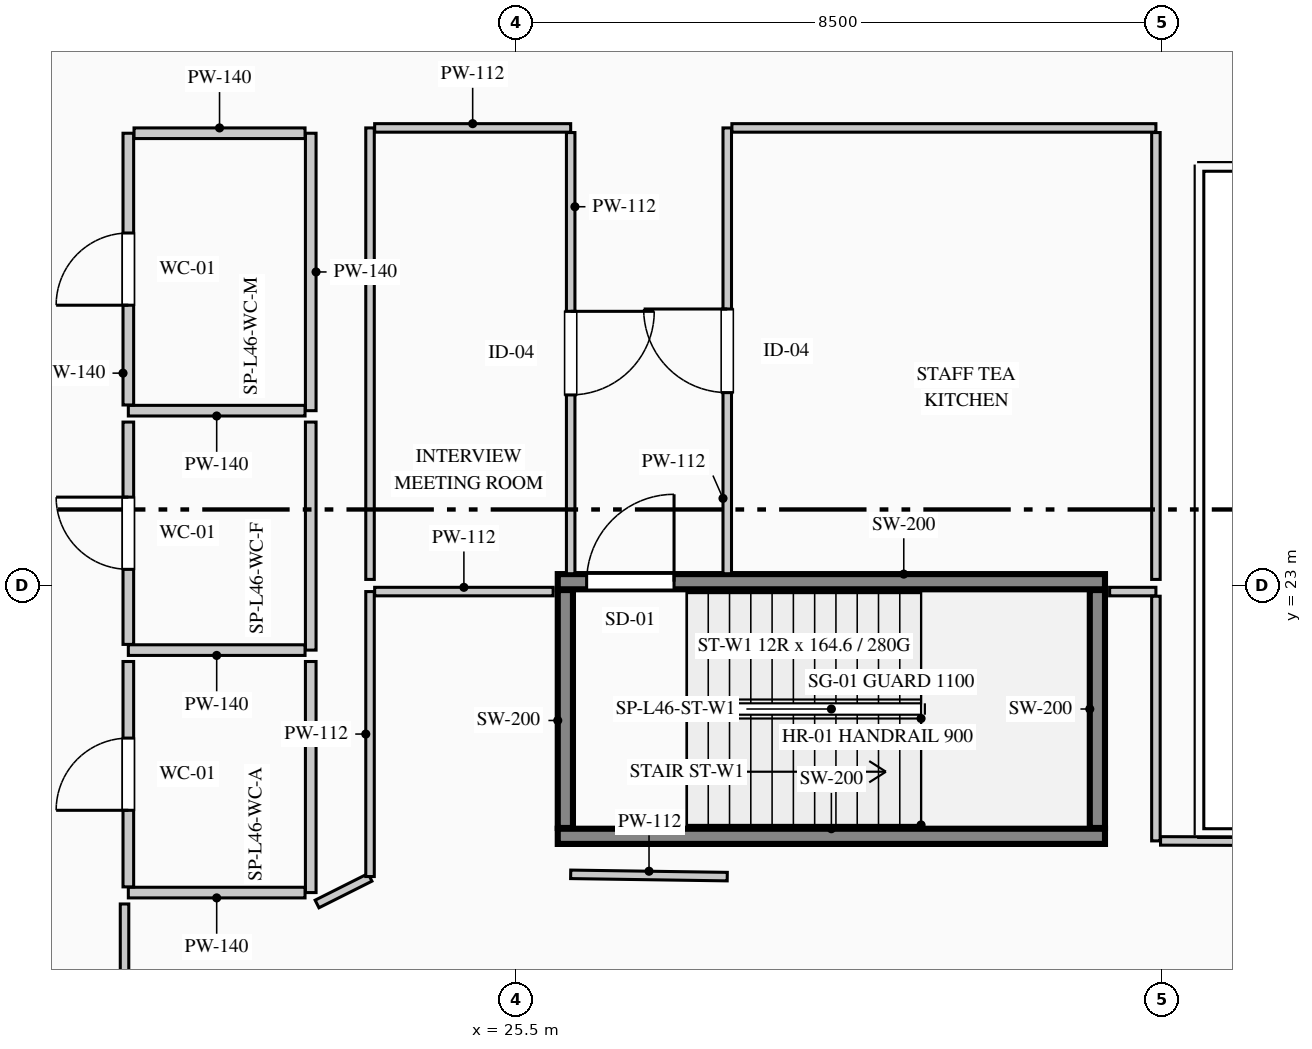
"""IFC4 building model, lengths in metres.
Left out: names, types, materials, properties, quantities, classifications, styles, units other than length and angle.
Written with IfcOpenShell. Run it as: python <this file> out.ifc"""

import sys

from ifc_helpers import new_model, si_unit, direction, frame, frame_2d, origin, place, context, subcontext, project, spatial, rectangle, extrude, element, fill, save


model = new_model("IFC4")
c1 = context("Model", 3, precision=1e-05, world=origin(), true_north=direction((0.0, 1.0)))
c2 = subcontext(c1, "Body", "Model", "MODEL_VIEW")
j1 = project(units=[si_unit("LENGTHUNIT", "METRE"), si_unit("PLANEANGLEUNIT", "RADIAN")], contexts=[c1])
p1 = place(None, origin())
s1 = spatial("IfcSite", under=j1, at=p1, CompositionType="ELEMENT")
p2 = place(p1, origin())
s2 = spatial("IfcBuilding", under=s1, at=p2, CompositionType="ELEMENT")
p3 = place(p2, frame((0.0, 0.0, 195.6)))
s3 = spatial("IfcBuildingStorey", under=s2, at=p3, CompositionType="ELEMENT", Elevation=195.6)
p4 = place(p3, frame((26.05, 19.7, 0.0), z_axis=(0.0, 0.0, 1.0), x_axis=(1.0, 0.0, 0.0)))
e1 = element("IfcWall", 1, at=p4, inside=s3, PredefinedType="SHEAR", context=c2, shape_type="SweptSolid", body=[
    extrude(rectangle(XDim=7.2, YDim=0.2, at=frame_2d((3.6, 0.0))), origin(), (0.0, 0.0, 1.0), 3.95),
])
p5 = place(p3, frame((26.05, 23.05, 0.0), z_axis=(0.0, 0.0, 1.0), x_axis=(1.0, 0.0, 0.0)))
e2 = element("IfcWall", 2, at=p5, inside=s3, PredefinedType="SHEAR", context=c2, shape_type="SweptSolid", body=[
    extrude(rectangle(XDim=7.2, YDim=0.2, at=frame_2d((3.6, 0.0))), origin(), (0.0, 0.0, 1.0), 3.95),
])
p6 = place(p5, frame((0.38, 0.0, 0.0)))
e3 = element("IfcOpeningElement", 3, at=p6, cuts=e2, PredefinedType="OPENING", context=c2, shape_type="SweptSolid", body=[
    extrude(rectangle(XDim=1.15, YDim=2.2, at=frame_2d((0.575, 1.1))), frame((0.0, 0.11, 0.0), z_axis=(0.0, -1.0, 0.0), x_axis=(1.0, 0.0, 0.0)), (0.0, 0.0, 1.0), 0.22),
])
for number, where, z_axis, x_axis in (
    (4, (26.15, 19.81, 0.0), (0.0, 0.0, 1.0), (0.0, 1.0, 0.0)),
    (5, (33.15, 19.81, 0.0), (0.0, 0.0, 1.0), (0.0, 1.0, 0.0)),
):
    element("IfcWall", number, at=place(p3, frame(where, z_axis=z_axis, x_axis=x_axis)), inside=s3, PredefinedType="SHEAR", context=c2, shape_type="SweptSolid", body=[
        extrude(rectangle(XDim=3.13, YDim=0.2, at=frame_2d((1.565, 0.0))), origin(), (0.0, 0.0, 1.0), 3.95),
    ])
p7 = place(p3, frame((22.8, 28.95, 0.0), z_axis=(0.0, 0.0, 1.0), x_axis=(0.0, -1.0, 0.0)))
e6 = element("IfcWall", 6, at=p7, inside=s3, PredefinedType="PARTITIONING", context=c2, shape_type="SweptSolid", body=[
    extrude(rectangle(XDim=3.65, YDim=0.14, at=frame_2d((1.825, 0.0))), origin(), (0.0, 0.0, 1.0), 3.285),
])
p8 = place(p3, frame((22.725, 25.3, 0.0), z_axis=(0.0, 0.0, 1.0), x_axis=(-1.0, 0.0, 0.0)))
e7 = element("IfcWall", 7, at=p8, inside=s3, PredefinedType="PARTITIONING", context=c2, shape_type="SweptSolid", body=[
    extrude(rectangle(XDim=2.325, YDim=0.14, at=frame_2d((1.163, 0.0))), origin(), (0.0, 0.0, 1.0), 3.7),
])
p9 = place(p3, frame((20.4, 25.375, 0.0), z_axis=(0.0, 0.0, 1.0), x_axis=(0.0, 1.0, 0.0)))
e8 = element("IfcWall", 8, at=p9, inside=s3, PredefinedType="PARTITIONING", context=c2, shape_type="SweptSolid", body=[
    extrude(rectangle(XDim=3.575, YDim=0.14, at=frame_2d((1.788, 0.0))), origin(), (0.0, 0.0, 1.0), 3.7),
])
p10 = place(p9, frame((1.312, 0.0, 0.0)))
e9 = element("IfcOpeningElement", 9, at=p10, cuts=e8, PredefinedType="OPENING", context=c2, shape_type="SweptSolid", body=[
    extrude(rectangle(XDim=0.95, YDim=2.15, at=frame_2d((0.475, 1.075))), frame((0.0, 0.08, 0.0), z_axis=(0.0, -1.0, 0.0), x_axis=(1.0, 0.0, 0.0)), (0.0, 0.0, 1.0), 0.16),
])
p11 = place(p3, frame((20.475, 28.95, 0.0), z_axis=(0.0, 0.0, 1.0), x_axis=(1.0, 0.0, 0.0)))
e10 = element("IfcWall", 10, at=p11, inside=s3, PredefinedType="PARTITIONING", context=c2, shape_type="SweptSolid", body=[
    extrude(rectangle(XDim=2.25, YDim=0.14, at=frame_2d((1.125, 0.0))), origin(), (0.0, 0.0, 1.0), 3.7),
])
p12 = place(p3, frame((22.8, 25.15, 0.0), z_axis=(0.0, 0.0, 1.0), x_axis=(0.0, -1.0, 0.0)))
e11 = element("IfcWall", 11, at=p12, inside=s3, PredefinedType="PARTITIONING", context=c2, shape_type="SweptSolid", body=[
    extrude(rectangle(XDim=3.0, YDim=0.14, at=frame_2d((1.5, 0.0))), origin(), (0.0, 0.0, 1.0), 3.285),
])
p13 = place(p3, frame((22.725, 22.15, 0.0), z_axis=(0.0, 0.0, 1.0), x_axis=(-1.0, 0.0, 0.0)))
e12 = element("IfcWall", 12, at=p13, inside=s3, PredefinedType="PARTITIONING", context=c2, shape_type="SweptSolid", body=[
    extrude(rectangle(XDim=2.325, YDim=0.14, at=frame_2d((1.163, 0.0))), origin(), (0.0, 0.0, 1.0), 3.7),
])
p14 = place(p3, frame((20.4, 22.225, 0.0), z_axis=(0.0, 0.0, 1.0), x_axis=(0.0, 1.0, 0.0)))
e13 = element("IfcWall", 13, at=p14, inside=s3, PredefinedType="PARTITIONING", context=c2, shape_type="SweptSolid", body=[
    extrude(rectangle(XDim=2.925, YDim=0.14, at=frame_2d((1.462, 0.0))), origin(), (0.0, 0.0, 1.0), 3.7),
])
p15 = place(p14, frame((0.988, 0.0, 0.0)))
e14 = element("IfcOpeningElement", 14, at=p15, cuts=e13, PredefinedType="OPENING", context=c2, shape_type="SweptSolid", body=[
    extrude(rectangle(XDim=0.95, YDim=2.15, at=frame_2d((0.475, 1.075))), frame((0.0, 0.08, 0.0), z_axis=(0.0, -1.0, 0.0), x_axis=(1.0, 0.0, 0.0)), (0.0, 0.0, 1.0), 0.16),
])
p16 = place(p3, frame((22.8, 22.0, 0.0), z_axis=(0.0, 0.0, 1.0), x_axis=(0.0, -1.0, 0.0)))
e15 = element("IfcWall", 15, at=p16, inside=s3, PredefinedType="PARTITIONING", context=c2, shape_type="SweptSolid", body=[
    extrude(rectangle(XDim=3.04, YDim=0.14, at=frame_2d((1.52, 0.0))), origin(), (0.0, 0.0, 1.0), 3.285),
])
p17 = place(p3, frame((22.725, 18.96, 0.0), z_axis=(0.0, 0.0, 1.0), x_axis=(-1.0, 0.0, 0.0)))
e16 = element("IfcWall", 16, at=p17, inside=s3, PredefinedType="PARTITIONING", context=c2, shape_type="SweptSolid", body=[
    extrude(rectangle(XDim=2.325, YDim=0.14, at=frame_2d((1.163, 0.0))), origin(), (0.0, 0.0, 1.0), 3.7),
])
p18 = place(p3, frame((20.4, 19.035, 0.0), z_axis=(0.0, 0.0, 1.0), x_axis=(0.0, 1.0, 0.0)))
e17 = element("IfcWall", 17, at=p18, inside=s3, PredefinedType="PARTITIONING", context=c2, shape_type="SweptSolid", body=[
    extrude(rectangle(XDim=2.965, YDim=0.14, at=frame_2d((1.482, 0.0))), origin(), (0.0, 0.0, 1.0), 3.7),
])
p19 = place(p18, frame((1.008, 0.0, 0.0)))
e18 = element("IfcOpeningElement", 18, at=p19, cuts=e17, PredefinedType="OPENING", context=c2, shape_type="SweptSolid", body=[
    extrude(rectangle(XDim=0.95, YDim=2.15, at=frame_2d((0.475, 1.075))), frame((0.0, 0.08, 0.0), z_axis=(0.0, -1.0, 0.0), x_axis=(1.0, 0.0, 0.0)), (0.0, 0.0, 1.0), 0.16),
])
p20 = place(p3, frame((33.311, 22.92, 0.0), z_axis=(0.0, 0.0, 1.0), x_axis=(1.0, 0.0, 0.0)))
e19 = element("IfcWall", 19, at=p20, inside=s3, PredefinedType="PARTITIONING", context=c2, shape_type="SweptSolid", body=[
    extrude(rectangle(XDim=0.609, YDim=0.112, at=frame_2d((0.305, 0.0))), origin(), (0.0, 0.0, 1.0), 3.7),
])
p21 = place(p3, frame((33.92, 22.859, 0.0), z_axis=(0.0, 0.0, 1.0), x_axis=(0.0, -1.0, 0.0)))
e20 = element("IfcWall", 20, at=p21, inside=s3, PredefinedType="PARTITIONING", context=c2, shape_type="SweptSolid", body=[
    extrude(rectangle(XDim=3.219, YDim=0.112, at=frame_2d((1.609, 0.0))), origin(), (0.0, 0.0, 1.0), 2.885),
])
p22 = place(p3, frame((33.981, 19.64, 0.0), z_axis=(0.0, 0.0, 1.0), x_axis=(0.999996388808, -0.002687447056, 0.0)))
e21 = element("IfcWall", 21, at=p22, inside=s3, PredefinedType="PARTITIONING", context=c2, shape_type="SweptSolid", body=[
    extrude(rectangle(XDim=9.175, YDim=0.112, at=frame_2d((4.588, 0.0))), origin(), (0.0, 0.0, 1.0), 3.7),
])
p23 = place(p3, frame((20.35, 12.8, 0.0), z_axis=(0.0, 0.0, 1.0), x_axis=(0.0, 1.0, 0.0)))
e22 = element("IfcWall", 22, at=p23, inside=s3, PredefinedType="PARTITIONING", context=c2, shape_type="SweptSolid", body=[
    extrude(rectangle(XDim=6.01, YDim=0.112, at=frame_2d((3.005, 0.0))), origin(), (0.0, 0.0, 1.0), 3.7),
])
p24 = place(p23, frame((2.455, 0.0, 0.0)))
e23 = element("IfcOpeningElement", 23, at=p24, cuts=e22, PredefinedType="OPENING", context=c2, shape_type="SweptSolid", body=[
    extrude(rectangle(XDim=1.1, YDim=2.2, at=frame_2d((0.55, 1.1))), frame((0.0, 0.066, 0.0), z_axis=(0.0, -1.0, 0.0), x_axis=(1.0, 0.0, 0.0)), (0.0, 0.0, 1.0), 0.132),
])
p25 = place(p3, frame((22.883, 18.81, 0.0), z_axis=(0.0, 0.0, 1.0), x_axis=(0.893737436086, 0.448590453909, 0.0)))
e24 = element("IfcWall", 24, at=p25, inside=s3, PredefinedType="PARTITIONING", context=c2, shape_type="SweptSolid", body=[
    extrude(rectangle(XDim=0.78, YDim=0.112, at=frame_2d((0.39, 0.0))), origin(), (0.0, 0.0, 1.0), 3.7),
])
p26 = place(p3, frame((23.58, 19.171, 0.0), z_axis=(0.0, 0.0, 1.0), x_axis=(0.0, 1.0, 0.0)))
e25 = element("IfcWall", 25, at=p26, inside=s3, PredefinedType="PARTITIONING", context=c2, shape_type="SweptSolid", body=[
    extrude(rectangle(XDim=3.749, YDim=0.112, at=frame_2d((1.875, 0.0))), origin(), (0.0, 0.0, 1.0), 3.7),
])
p27 = place(p3, frame((23.641, 22.92, 0.0), z_axis=(0.0, 0.0, 1.0), x_axis=(1.0, 0.0, 0.0)))
e26 = element("IfcWall", 26, at=p27, inside=s3, PredefinedType="PARTITIONING", context=c2, shape_type="SweptSolid", body=[
    extrude(rectangle(XDim=2.348, YDim=0.112, at=frame_2d((1.174, 0.0))), origin(), (0.0, 0.0, 1.0), 3.7),
])
p28 = place(p3, frame((26.22, 19.2, 0.0), z_axis=(0.0, 0.0, 1.0), x_axis=(0.999893773718, -0.014575365509, 0.0)))
e27 = element("IfcWall", 27, at=p28, inside=s3, PredefinedType="PARTITIONING", context=c2, shape_type="SweptSolid", body=[
    extrude(rectangle(XDim=2.06, YDim=0.112, at=frame_2d((1.03, 0.0))), origin(), (0.0, 0.0, 1.0), 3.7),
])
p29 = place(p3, frame((23.58, 23.08, 0.0), z_axis=(0.0, 0.0, 1.0), x_axis=(0.0, 1.0, 0.0)))
e28 = element("IfcWall", 28, at=p29, inside=s3, PredefinedType="PARTITIONING", context=c2, shape_type="SweptSolid", body=[
    extrude(rectangle(XDim=5.94, YDim=0.112, at=frame_2d((2.97, 0.0))), origin(), (0.0, 0.0, 1.0), 3.7),
])
p30 = place(p3, frame((23.641, 29.02, 0.0), z_axis=(0.0, 0.0, 1.0), x_axis=(1.0, 0.0, 0.0)))
e29 = element("IfcWall", 29, at=p30, inside=s3, PredefinedType="PARTITIONING", context=c2, shape_type="SweptSolid", body=[
    extrude(rectangle(XDim=2.579, YDim=0.112, at=frame_2d((1.29, 0.0))), origin(), (0.0, 0.0, 1.0), 3.485),
])
p31 = place(p3, frame((26.22, 28.959, 0.0), z_axis=(0.0, 0.0, 1.0), x_axis=(0.0, -1.0, 0.0)))
e30 = element("IfcWall", 30, at=p31, inside=s3, PredefinedType="PARTITIONING", context=c2, shape_type="SweptSolid", body=[
    extrude(rectangle(XDim=5.804, YDim=0.112, at=frame_2d((2.902, 0.0))), origin(), (0.0, 0.0, 1.0), 3.7),
])
p32 = place(p31, frame((2.352, 0.0, 0.0)))
e31 = element("IfcOpeningElement", 31, at=p32, cuts=e30, PredefinedType="OPENING", context=c2, shape_type="SweptSolid", body=[
    extrude(rectangle(XDim=1.1, YDim=2.2, at=frame_2d((0.55, 1.1))), frame((0.0, 0.066, 0.0), z_axis=(0.0, -1.0, 0.0), x_axis=(1.0, 0.0, 0.0)), (0.0, 0.0, 1.0), 0.132),
])
p33 = place(p3, frame((28.28, 23.155, 0.0), z_axis=(0.0, 0.0, 1.0), x_axis=(0.0, 1.0, 0.0)))
e32 = element("IfcWall", 32, at=p33, inside=s3, PredefinedType="PARTITIONING", context=c2, shape_type="SweptSolid", body=[
    extrude(rectangle(XDim=5.865, YDim=0.112, at=frame_2d((2.933, 0.0))), origin(), (0.0, 0.0, 1.0), 3.7),
])
p34 = place(p33, frame((2.383, 0.0, 0.0)))
e33 = element("IfcOpeningElement", 33, at=p34, cuts=e32, PredefinedType="OPENING", context=c2, shape_type="SweptSolid", body=[
    extrude(rectangle(XDim=1.1, YDim=2.2, at=frame_2d((0.55, 1.1))), frame((0.0, 0.066, 0.0), z_axis=(0.0, -1.0, 0.0), x_axis=(1.0, 0.0, 0.0)), (0.0, 0.0, 1.0), 0.132),
])
p35 = place(p3, frame((28.341, 29.02, 0.0), z_axis=(0.0, 0.0, 1.0), x_axis=(1.0, 0.0, 0.0)))
e34 = element("IfcWall", 34, at=p35, inside=s3, PredefinedType="PARTITIONING", context=c2, shape_type="SweptSolid", body=[
    extrude(rectangle(XDim=5.579, YDim=0.112, at=frame_2d((2.79, 0.0))), origin(), (0.0, 0.0, 1.0), 3.485),
])
p36 = place(p3, frame((33.92, 28.959, 0.0), z_axis=(0.0, 0.0, 1.0), x_axis=(0.0, -1.0, 0.0)))
e35 = element("IfcWall", 35, at=p36, inside=s3, PredefinedType="PARTITIONING", context=c2, shape_type="SweptSolid", body=[
    extrude(rectangle(XDim=5.879, YDim=0.112, at=frame_2d((2.939, 0.0))), origin(), (0.0, 0.0, 1.0), 2.885),
])
p37 = place(p6, origin())
e36 = element("IfcDoor", 36, at=p37, inside=s3, OperationType="SINGLE_SWING_RIGHT", PredefinedType="DOOR", context=c2, shape_type="SweptSolid", body=[
    extrude(rectangle(XDim=1.15, YDim=2.2, at=frame_2d((0.575, 1.1))), frame((0.0, 0.025, 0.0), z_axis=(0.0, -1.0, 0.0), x_axis=(1.0, 0.0, 0.0)), (0.0, 0.0, 1.0), 0.05),
])
fill(e3, e36)
p38 = place(p10, origin())
e37 = element("IfcDoor", 37, at=p38, inside=s3, OperationType="SINGLE_SWING_LEFT", PredefinedType="DOOR", context=c2, shape_type="SweptSolid", body=[
    extrude(rectangle(XDim=0.95, YDim=2.15, at=frame_2d((0.475, 1.075))), frame((0.0, 0.025, 0.0), z_axis=(0.0, -1.0, 0.0), x_axis=(1.0, 0.0, 0.0)), (0.0, 0.0, 1.0), 0.05),
])
fill(e9, e37)
p39 = place(p15, origin())
e38 = element("IfcDoor", 38, at=p39, inside=s3, OperationType="SINGLE_SWING_RIGHT", PredefinedType="DOOR", context=c2, shape_type="SweptSolid", body=[
    extrude(rectangle(XDim=0.95, YDim=2.15, at=frame_2d((0.475, 1.075))), frame((0.0, 0.025, 0.0), z_axis=(0.0, -1.0, 0.0), x_axis=(1.0, 0.0, 0.0)), (0.0, 0.0, 1.0), 0.05),
])
fill(e14, e38)
p40 = place(p19, origin())
e39 = element("IfcDoor", 39, at=p40, inside=s3, OperationType="SINGLE_SWING_LEFT", PredefinedType="DOOR", context=c2, shape_type="SweptSolid", body=[
    extrude(rectangle(XDim=0.95, YDim=2.15, at=frame_2d((0.475, 1.075))), frame((0.0, 0.025, 0.0), z_axis=(0.0, -1.0, 0.0), x_axis=(1.0, 0.0, 0.0)), (0.0, 0.0, 1.0), 0.05),
])
fill(e18, e39)
p41 = place(p32, origin())
e40 = element("IfcDoor", 40, at=p41, inside=s3, OperationType="SINGLE_SWING_LEFT", PredefinedType="DOOR", context=c2, shape_type="SweptSolid", body=[
    extrude(rectangle(XDim=1.1, YDim=2.2, at=frame_2d((0.55, 1.1))), frame((0.0, 0.025, 0.0), z_axis=(0.0, -1.0, 0.0), x_axis=(1.0, 0.0, 0.0)), (0.0, 0.0, 1.0), 0.05),
])
fill(e31, e40)
p42 = place(p34, origin())
e41 = element("IfcDoor", 41, at=p42, inside=s3, OperationType="SINGLE_SWING_RIGHT", PredefinedType="DOOR", context=c2, shape_type="SweptSolid", body=[
    extrude(rectangle(XDim=1.1, YDim=2.2, at=frame_2d((0.55, 1.1))), frame((0.0, 0.025, 0.0), z_axis=(0.0, -1.0, 0.0), x_axis=(1.0, 0.0, 0.0)), (0.0, 0.0, 1.0), 0.05),
])
fill(e33, e41)
save(model, sys.argv[1])
